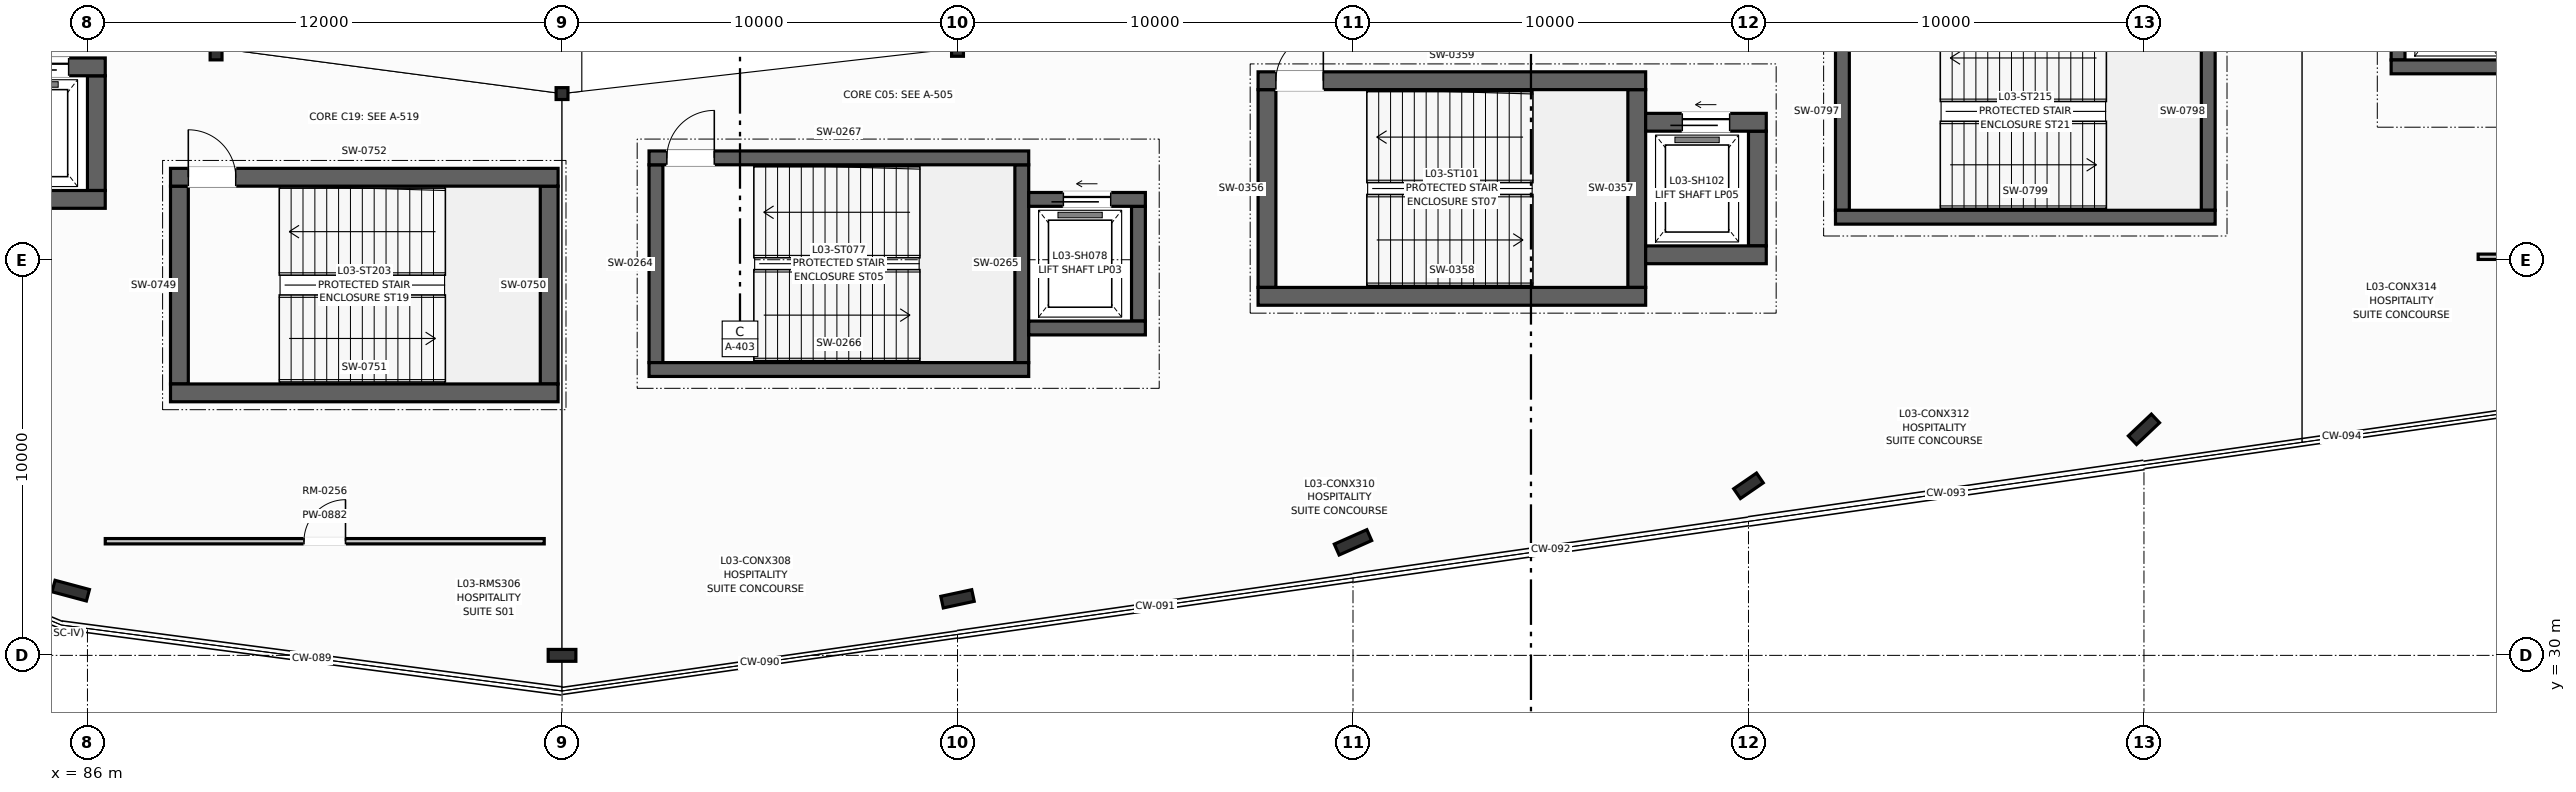
"""IFC4 building model, lengths in metres.
Left out: names, types, materials, properties, quantities, classifications, styles, units other than length and angle.
Written with IfcOpenShell. Run it as: python <this file> out.ifc"""

import sys

from ifc_helpers import new_model, si_unit, direction, frame, frame_2d, origin, origin_2d, place, context, subcontext, project, spatial, rectangle, i_section, extrude, element, fill, save


model = new_model("IFC4")
c1 = context("Model", 3, precision=1e-05, world=origin(), true_north=direction((0.0, 1.0)))
c2 = subcontext(c1, "Body", "Model", "MODEL_VIEW")
j1 = project(units=[si_unit("LENGTHUNIT", "METRE"), si_unit("PLANEANGLEUNIT", "RADIAN")], contexts=[c1])
p1 = place(None, origin())
s1 = spatial("IfcSite", under=j1, at=p1, CompositionType="ELEMENT")
p2 = place(p1, origin())
s2 = spatial("IfcBuilding", under=s1, at=p2, CompositionType="ELEMENT")
p3 = place(p2, frame((0.0, 0.0, 13.5)))
s3 = spatial("IfcBuildingStorey", under=s2, at=p3, CompositionType="ELEMENT", Elevation=13.5)
p4 = place(p3, frame((89.252, 45.352, 0.0), z_axis=(0.0, 0.0, 1.0), x_axis=(1.0, 0.0, 0.0)))
e1 = element("IfcColumn", 1, at=p4, inside=s3, PredefinedType="COLUMN", context=c2, shape_type="SweptSolid", body=[
    extrude(i_section(OverallWidth=0.3, OverallDepth=0.6, WebThickness=0.015, FlangeThickness=0.03, at=origin_2d()), origin(), (0.0, 0.0, 1.0), 4.5),
])
p5 = place(p3, frame((98.0, 44.2, 0.0), z_axis=(0.0, 0.0, 1.0), x_axis=(1.0, 0.0, 0.0)))
e2 = element("IfcColumn", 2, at=p5, inside=s3, PredefinedType="COLUMN", context=c2, shape_type="SweptSolid", body=[
    extrude(i_section(OverallWidth=0.3, OverallDepth=0.3, WebThickness=0.011, FlangeThickness=0.019, at=origin_2d()), origin(), (0.0, 0.0, 1.0), 4.5),
])
p6 = place(p3, frame((108.0, 45.343, 0.0), z_axis=(0.0, 0.0, 1.0), x_axis=(1.0, 0.0, 0.0)))
e3 = element("IfcColumn", 3, at=p6, inside=s3, PredefinedType="COLUMN", context=c2, shape_type="SweptSolid", body=[
    extrude(i_section(OverallWidth=0.3, OverallDepth=0.4, WebThickness=0.013, FlangeThickness=0.024, at=origin_2d()), origin(), (0.0, 0.0, 1.0), 4.5),
])
p7 = place(p3, frame((85.577, 31.636, 0.0), z_axis=(0.0, 0.0, 1.0), x_axis=(0.258819045103, 0.965925826289, 0.0)))
e4 = element("IfcColumn", 4, at=p7, inside=s3, PredefinedType="COLUMN", context=c2, shape_type="SweptSolid", body=[
    extrude(i_section(OverallWidth=0.3, OverallDepth=0.9, WebThickness=0.019, FlangeThickness=0.035, at=origin_2d()), origin(), (0.0, 0.0, 1.0), 4.5),
])
p8 = place(p3, frame((98.0, 30.0, 0.0), z_axis=(0.0, 0.0, 1.0), x_axis=(0.0, 1.0, 0.0)))
e5 = element("IfcColumn", 5, at=p8, inside=s3, PredefinedType="COLUMN", context=c2, shape_type="SweptSolid", body=[
    extrude(i_section(OverallWidth=0.3, OverallDepth=0.7, WebThickness=0.017, FlangeThickness=0.032, at=origin_2d()), origin(), (0.0, 0.0, 1.0), 4.5),
])
p9 = place(p3, frame((108.0, 31.429, 0.0), z_axis=(0.0, 0.0, 1.0), x_axis=(-0.209618562904, 0.977783236759, 0.0)))
e6 = element("IfcColumn", 6, at=p9, inside=s3, PredefinedType="COLUMN", context=c2, shape_type="SweptSolid", body=[
    extrude(i_section(OverallWidth=0.3, OverallDepth=0.8, WebThickness=0.018, FlangeThickness=0.033, at=origin_2d()), origin(), (0.0, 0.0, 1.0), 4.5),
])
p10 = place(p3, frame((118.0, 32.857, 0.0), z_axis=(0.0, 0.0, 1.0), x_axis=(-0.40514158678, 0.914253955234, 0.0)))
e7 = element("IfcColumn", 7, at=p10, inside=s3, PredefinedType="COLUMN", context=c2, shape_type="SweptSolid", body=[
    extrude(i_section(OverallWidth=0.3, OverallDepth=0.9, WebThickness=0.019, FlangeThickness=0.035, at=origin_2d()), origin(), (0.0, 0.0, 1.0), 4.5),
])
p11 = place(p3, frame((128.0, 34.286, 0.0), z_axis=(0.0, 0.0, 1.0), x_axis=(-0.566406236925, 0.824126188622, 0.0)))
e8 = element("IfcColumn", 8, at=p11, inside=s3, PredefinedType="COLUMN", context=c2, shape_type="SweptSolid", body=[
    extrude(i_section(OverallWidth=0.3, OverallDepth=0.7, WebThickness=0.017, FlangeThickness=0.032, at=origin_2d()), origin(), (0.0, 0.0, 1.0), 4.5),
])
p12 = place(p3, frame((138.0, 35.714, 0.0), z_axis=(0.0, 0.0, 1.0), x_axis=(-0.687087510804, 0.726574670971, 0.0)))
e9 = element("IfcColumn", 9, at=p12, inside=s3, PredefinedType="COLUMN", context=c2, shape_type="SweptSolid", body=[
    extrude(i_section(OverallWidth=0.3, OverallDepth=0.8, WebThickness=0.018, FlangeThickness=0.033, at=origin_2d()), origin(), (0.0, 0.0, 1.0), 4.5),
])
p13 = place(p3, frame((86.225, 41.75, 0.0), z_axis=(0.0, 0.0, 1.0), x_axis=(0.0, 1.0, 0.0)))
e10 = element("IfcWall", 10, at=p13, inside=s3, PredefinedType="SHEAR", context=c2, shape_type="SweptSolid", body=[
    extrude(rectangle(XDim=2.9, YDim=0.45, at=frame_2d((1.45, 0.0))), origin(), (0.0, 0.0, 1.0), 4.25),
])
p14 = place(p3, frame((83.4, 41.525, 0.0), z_axis=(0.0, 0.0, 1.0), x_axis=(1.0, 0.0, 0.0)))
e11 = element("IfcWall", 11, at=p14, inside=s3, PredefinedType="SHEAR", context=c2, shape_type="SweptSolid", body=[
    extrude(rectangle(XDim=3.05, YDim=0.45, at=frame_2d((1.525, 0.0))), origin(), (0.0, 0.0, 1.0), 4.25),
])
p15 = place(p3, frame((83.4, 44.875, 0.0), z_axis=(0.0, 0.0, 1.0), x_axis=(1.0, 0.0, 0.0)))
e12 = element("IfcWall", 12, at=p15, inside=s3, PredefinedType="SHEAR", context=c2, shape_type="SweptSolid", body=[
    extrude(rectangle(XDim=3.05, YDim=0.45, at=frame_2d((1.525, 0.0))), origin(), (0.0, 0.0, 1.0), 4.25),
])
p16 = place(p15, frame((0.925, 0.0, 0.0)))
e13 = element("IfcOpeningElement", 13, at=p16, cuts=e12, PredefinedType="OPENING", context=c2, shape_type="SweptSolid", body=[
    extrude(rectangle(XDim=1.2, YDim=2.2, at=frame_2d((0.6, 1.1))), frame((0.0, 0.235, 0.0), z_axis=(0.0, -1.0, 0.0), x_axis=(1.0, 0.0, 0.0)), (0.0, 0.0, 1.0), 0.47),
])
for number, where, z_axis, x_axis in (
    (14, (100.375, 37.4, 0.0), (0.0, 0.0, 1.0), (0.0, 1.0, 0.0)),
    (15, (109.625, 37.4, 0.0), (0.0, 0.0, 1.0), (0.0, 1.0, 0.0)),
):
    element("IfcWall", number, at=place(p3, frame(where, z_axis=z_axis, x_axis=x_axis)), inside=s3, PredefinedType="SHEAR", context=c2, shape_type="SweptSolid", body=[
        extrude(rectangle(XDim=5.0, YDim=0.35, at=frame_2d((2.5, 0.0))), origin(), (0.0, 0.0, 1.0), 4.25),
    ])
p17 = place(p3, frame((100.2, 37.225, 0.0), z_axis=(0.0, 0.0, 1.0), x_axis=(1.0, 0.0, 0.0)))
e16 = element("IfcWall", 16, at=p17, inside=s3, PredefinedType="SHEAR", context=c2, shape_type="SweptSolid", body=[
    extrude(rectangle(XDim=9.6, YDim=0.35, at=frame_2d((4.8, 0.0))), origin(), (0.0, 0.0, 1.0), 4.25),
])
p18 = place(p3, frame((100.2, 42.575, 0.0), z_axis=(0.0, 0.0, 1.0), x_axis=(1.0, 0.0, 0.0)))
e17 = element("IfcWall", 17, at=p18, inside=s3, PredefinedType="SHEAR", context=c2, shape_type="SweptSolid", body=[
    extrude(rectangle(XDim=9.6, YDim=0.35, at=frame_2d((4.8, 0.0))), origin(), (0.0, 0.0, 1.0), 4.25),
])
p19 = place(p18, frame((0.45, 0.0, 0.0)))
e18 = element("IfcOpeningElement", 18, at=p19, cuts=e17, PredefinedType="OPENING", context=c2, shape_type="SweptSolid", body=[
    extrude(rectangle(XDim=1.2, YDim=2.2, at=frame_2d((0.6, 1.1))), frame((0.0, 0.185, 0.0), z_axis=(0.0, -1.0, 0.0), x_axis=(1.0, 0.0, 0.0)), (0.0, 0.0, 1.0), 0.37),
])
p20 = place(p3, frame((112.575, 38.45, 0.0), z_axis=(0.0, 0.0, 1.0), x_axis=(0.0, 1.0, 0.0)))
e19 = element("IfcWall", 19, at=p20, inside=s3, PredefinedType="SHEAR", context=c2, shape_type="SweptSolid", body=[
    extrude(rectangle(XDim=2.9, YDim=0.35, at=frame_2d((1.45, 0.0))), origin(), (0.0, 0.0, 1.0), 4.25),
])
p21 = place(p3, frame((109.8, 38.275, 0.0), z_axis=(0.0, 0.0, 1.0), x_axis=(1.0, 0.0, 0.0)))
e20 = element("IfcWall", 20, at=p21, inside=s3, PredefinedType="SHEAR", context=c2, shape_type="SweptSolid", body=[
    extrude(rectangle(XDim=2.95, YDim=0.35, at=frame_2d((1.475, 0.0))), origin(), (0.0, 0.0, 1.0), 4.25),
])
p22 = place(p3, frame((109.8, 41.525, 0.0), z_axis=(0.0, 0.0, 1.0), x_axis=(1.0, 0.0, 0.0)))
e21 = element("IfcWall", 21, at=p22, inside=s3, PredefinedType="SHEAR", context=c2, shape_type="SweptSolid", body=[
    extrude(rectangle(XDim=2.95, YDim=0.35, at=frame_2d((1.475, 0.0))), origin(), (0.0, 0.0, 1.0), 4.25),
])
p23 = place(p22, frame((0.875, 0.0, 0.0)))
e22 = element("IfcOpeningElement", 22, at=p23, cuts=e21, PredefinedType="OPENING", context=c2, shape_type="SweptSolid", body=[
    extrude(rectangle(XDim=1.2, YDim=2.2, at=frame_2d((0.6, 1.1))), frame((0.0, 0.185, 0.0), z_axis=(0.0, -1.0, 0.0), x_axis=(1.0, 0.0, 0.0)), (0.0, 0.0, 1.0), 0.37),
])
for number, where, z_axis, x_axis in (
    (23, (115.825, 39.3, 0.0), (0.0, 0.0, 1.0), (0.0, 1.0, 0.0)),
    (24, (125.175, 39.3, 0.0), (0.0, 0.0, 1.0), (0.0, 1.0, 0.0)),
):
    element("IfcWall", number, at=place(p3, frame(where, z_axis=z_axis, x_axis=x_axis)), inside=s3, PredefinedType="SHEAR", context=c2, shape_type="SweptSolid", body=[
        extrude(rectangle(XDim=5.0, YDim=0.45, at=frame_2d((2.5, 0.0))), origin(), (0.0, 0.0, 1.0), 4.25),
    ])
p24 = place(p3, frame((115.6, 39.075, 0.0), z_axis=(0.0, 0.0, 1.0), x_axis=(1.0, 0.0, 0.0)))
e25 = element("IfcWall", 25, at=p24, inside=s3, PredefinedType="SHEAR", context=c2, shape_type="SweptSolid", body=[
    extrude(rectangle(XDim=9.8, YDim=0.45, at=frame_2d((4.9, 0.0))), origin(), (0.0, 0.0, 1.0), 4.25),
])
p25 = place(p3, frame((115.6, 44.525, 0.0), z_axis=(0.0, 0.0, 1.0), x_axis=(1.0, 0.0, 0.0)))
e26 = element("IfcWall", 26, at=p25, inside=s3, PredefinedType="SHEAR", context=c2, shape_type="SweptSolid", body=[
    extrude(rectangle(XDim=9.8, YDim=0.45, at=frame_2d((4.9, 0.0))), origin(), (0.0, 0.0, 1.0), 4.25),
])
p26 = place(p25, frame((0.45, 0.0, 0.0)))
e27 = element("IfcOpeningElement", 27, at=p26, cuts=e26, PredefinedType="OPENING", context=c2, shape_type="SweptSolid", body=[
    extrude(rectangle(XDim=1.2, YDim=2.2, at=frame_2d((0.6, 1.1))), frame((0.0, 0.235, 0.0), z_axis=(0.0, -1.0, 0.0), x_axis=(1.0, 0.0, 0.0)), (0.0, 0.0, 1.0), 0.47),
])
p27 = place(p3, frame((128.225, 40.35, 0.0), z_axis=(0.0, 0.0, 1.0), x_axis=(0.0, 1.0, 0.0)))
e28 = element("IfcWall", 28, at=p27, inside=s3, PredefinedType="SHEAR", context=c2, shape_type="SweptSolid", body=[
    extrude(rectangle(XDim=2.9, YDim=0.45, at=frame_2d((1.45, 0.0))), origin(), (0.0, 0.0, 1.0), 4.25),
])
p28 = place(p3, frame((125.4, 40.125, 0.0), z_axis=(0.0, 0.0, 1.0), x_axis=(1.0, 0.0, 0.0)))
e29 = element("IfcWall", 29, at=p28, inside=s3, PredefinedType="SHEAR", context=c2, shape_type="SweptSolid", body=[
    extrude(rectangle(XDim=3.05, YDim=0.45, at=frame_2d((1.525, 0.0))), origin(), (0.0, 0.0, 1.0), 4.25),
])
p29 = place(p3, frame((125.4, 43.475, 0.0), z_axis=(0.0, 0.0, 1.0), x_axis=(1.0, 0.0, 0.0)))
e30 = element("IfcWall", 30, at=p29, inside=s3, PredefinedType="SHEAR", context=c2, shape_type="SweptSolid", body=[
    extrude(rectangle(XDim=3.05, YDim=0.45, at=frame_2d((1.525, 0.0))), origin(), (0.0, 0.0, 1.0), 4.25),
])
p30 = place(p29, frame((0.925, 0.0, 0.0)))
e31 = element("IfcOpeningElement", 31, at=p30, cuts=e30, PredefinedType="OPENING", context=c2, shape_type="SweptSolid", body=[
    extrude(rectangle(XDim=1.2, YDim=2.2, at=frame_2d((0.6, 1.1))), frame((0.0, 0.235, 0.0), z_axis=(0.0, -1.0, 0.0), x_axis=(1.0, 0.0, 0.0)), (0.0, 0.0, 1.0), 0.47),
])
p31 = place(p3, frame((144.425, 45.05, 0.0), z_axis=(0.0, 0.0, 1.0), x_axis=(0.0, 1.0, 0.0)))
e32 = element("IfcWall", 32, at=p31, inside=s3, PredefinedType="SHEAR", context=c2, shape_type="SweptSolid", body=[
    extrude(rectangle(XDim=2.9, YDim=0.35, at=frame_2d((1.45, 0.0))), origin(), (0.0, 0.0, 1.0), 4.25),
])
p32 = place(p3, frame((144.25, 44.875, 0.0), z_axis=(0.0, 0.0, 1.0), x_axis=(1.0, 0.0, 0.0)))
e33 = element("IfcWall", 33, at=p32, inside=s3, PredefinedType="SHEAR", context=c2, shape_type="SweptSolid", body=[
    extrude(rectangle(XDim=2.95, YDim=0.35, at=frame_2d((1.475, 0.0))), origin(), (0.0, 0.0, 1.0), 4.25),
])
for number, where, z_axis, x_axis in (
    (34, (88.325, 36.86, 0.0), (0.0, 0.0, 1.0), (0.0, 1.0, 0.0)),
    (35, (97.675, 36.86, 0.0), (0.0, 0.0, 1.0), (0.0, 1.0, 0.0)),
):
    element("IfcWall", number, at=place(p3, frame(where, z_axis=z_axis, x_axis=x_axis)), inside=s3, PredefinedType="SHEAR", context=c2, shape_type="SweptSolid", body=[
        extrude(rectangle(XDim=5.0, YDim=0.45, at=frame_2d((2.5, 0.0))), origin(), (0.0, 0.0, 1.0), 4.25),
    ])
p33 = place(p3, frame((88.1, 36.635, 0.0), z_axis=(0.0, 0.0, 1.0), x_axis=(1.0, 0.0, 0.0)))
e36 = element("IfcWall", 36, at=p33, inside=s3, PredefinedType="SHEAR", context=c2, shape_type="SweptSolid", body=[
    extrude(rectangle(XDim=9.8, YDim=0.45, at=frame_2d((4.9, 0.0))), origin(), (0.0, 0.0, 1.0), 4.25),
])
p34 = place(p3, frame((88.1, 42.085, 0.0), z_axis=(0.0, 0.0, 1.0), x_axis=(1.0, 0.0, 0.0)))
e37 = element("IfcWall", 37, at=p34, inside=s3, PredefinedType="SHEAR", context=c2, shape_type="SweptSolid", body=[
    extrude(rectangle(XDim=9.8, YDim=0.45, at=frame_2d((4.9, 0.0))), origin(), (0.0, 0.0, 1.0), 4.25),
])
p35 = place(p34, frame((0.45, 0.0, 0.0)))
e38 = element("IfcOpeningElement", 38, at=p35, cuts=e37, PredefinedType="OPENING", context=c2, shape_type="SweptSolid", body=[
    extrude(rectangle(XDim=1.2, YDim=2.2, at=frame_2d((0.6, 1.1))), frame((0.0, 0.235, 0.0), z_axis=(0.0, -1.0, 0.0), x_axis=(1.0, 0.0, 0.0)), (0.0, 0.0, 1.0), 0.47),
])
for number, where, z_axis, x_axis in (
    (39, (130.375, 41.25, 0.0), (0.0, 0.0, 1.0), (0.0, 1.0, 0.0)),
    (40, (139.625, 41.25, 0.0), (0.0, 0.0, 1.0), (0.0, 1.0, 0.0)),
):
    element("IfcWall", number, at=place(p3, frame(where, z_axis=z_axis, x_axis=x_axis)), inside=s3, PredefinedType="SHEAR", context=c2, shape_type="SweptSolid", body=[
        extrude(rectangle(XDim=5.0, YDim=0.35, at=frame_2d((2.5, 0.0))), origin(), (0.0, 0.0, 1.0), 4.25),
    ])
p36 = place(p3, frame((130.2, 41.075, 0.0), z_axis=(0.0, 0.0, 1.0), x_axis=(1.0, 0.0, 0.0)))
e41 = element("IfcWall", 41, at=p36, inside=s3, PredefinedType="SHEAR", context=c2, shape_type="SweptSolid", body=[
    extrude(rectangle(XDim=9.6, YDim=0.35, at=frame_2d((4.8, 0.0))), origin(), (0.0, 0.0, 1.0), 4.25),
])
p37 = place(p3, frame((86.45, 32.885, 0.0), z_axis=(0.0, 0.0, 1.0), x_axis=(1.0, 0.0, 0.0)))
e42 = element("IfcWall", 42, at=p37, inside=s3, PredefinedType="PARTITIONING", context=c2, shape_type="SweptSolid", body=[
    extrude(rectangle(XDim=11.1, YDim=0.135, at=frame_2d((5.55, 0.0))), origin(), (0.0, 0.0, 1.0), 3.22),
])
p38 = place(p37, frame((5.025, 0.0, 0.0)))
e43 = element("IfcOpeningElement", 43, at=p38, cuts=e42, PredefinedType="OPENING", context=c2, shape_type="SweptSolid", body=[
    extrude(rectangle(XDim=1.05, YDim=2.15, at=frame_2d((0.525, 1.075))), frame((0.0, 0.077, 0.0), z_axis=(0.0, -1.0, 0.0), x_axis=(1.0, 0.0, 0.0)), (0.0, 0.0, 1.0), 0.155),
])
p39 = place(p3, frame((146.45, 40.075, 0.0), z_axis=(0.0, 0.0, 1.0), x_axis=(1.0, 0.0, 0.0)))
e44 = element("IfcWall", 44, at=p39, inside=s3, PredefinedType="PARTITIONING", context=c2, shape_type="SweptSolid", body=[
    extrude(rectangle(XDim=11.1, YDim=0.135, at=frame_2d((5.55, 0.0))), origin(), (0.0, 0.0, 1.0), 3.22),
])
p40 = place(p39, frame((5.025, 0.0, 0.0)))
e45 = element("IfcOpeningElement", 45, at=p40, cuts=e44, PredefinedType="OPENING", context=c2, shape_type="SweptSolid", body=[
    extrude(rectangle(XDim=1.05, YDim=2.15, at=frame_2d((0.525, 1.075))), frame((0.0, 0.077, 0.0), z_axis=(0.0, -1.0, 0.0), x_axis=(1.0, 0.0, 0.0)), (0.0, 0.0, 1.0), 0.155),
])
p41 = place(p16, origin())
e46 = element("IfcDoor", 46, at=p41, inside=s3, OperationType="SLIDING_TO_LEFT", PredefinedType="DOOR", context=c2, shape_type="SweptSolid", body=[
    extrude(rectangle(XDim=1.2, YDim=2.2, at=frame_2d((0.6, 1.1))), frame((0.0, 0.025, 0.0), z_axis=(0.0, -1.0, 0.0), x_axis=(1.0, 0.0, 0.0)), (0.0, 0.0, 1.0), 0.05),
])
fill(e13, e46)
p42 = place(p19, origin())
e47 = element("IfcDoor", 47, at=p42, inside=s3, OperationType="SINGLE_SWING_RIGHT", PredefinedType="DOOR", context=c2, shape_type="SweptSolid", body=[
    extrude(rectangle(XDim=1.2, YDim=2.2, at=frame_2d((0.6, 1.1))), frame((0.0, 0.025, 0.0), z_axis=(0.0, -1.0, 0.0), x_axis=(1.0, 0.0, 0.0)), (0.0, 0.0, 1.0), 0.05),
])
fill(e18, e47)
p43 = place(p23, origin())
e48 = element("IfcDoor", 48, at=p43, inside=s3, OperationType="SLIDING_TO_LEFT", PredefinedType="DOOR", context=c2, shape_type="SweptSolid", body=[
    extrude(rectangle(XDim=1.2, YDim=2.2, at=frame_2d((0.6, 1.1))), frame((0.0, 0.025, 0.0), z_axis=(0.0, -1.0, 0.0), x_axis=(1.0, 0.0, 0.0)), (0.0, 0.0, 1.0), 0.05),
])
fill(e22, e48)
p44 = place(p26, origin())
e49 = element("IfcDoor", 49, at=p44, inside=s3, OperationType="SINGLE_SWING_RIGHT", PredefinedType="DOOR", context=c2, shape_type="SweptSolid", body=[
    extrude(rectangle(XDim=1.2, YDim=2.2, at=frame_2d((0.6, 1.1))), frame((0.0, 0.025, 0.0), z_axis=(0.0, -1.0, 0.0), x_axis=(1.0, 0.0, 0.0)), (0.0, 0.0, 1.0), 0.05),
])
fill(e27, e49)
p45 = place(p30, origin())
e50 = element("IfcDoor", 50, at=p45, inside=s3, OperationType="SLIDING_TO_LEFT", PredefinedType="DOOR", context=c2, shape_type="SweptSolid", body=[
    extrude(rectangle(XDim=1.2, YDim=2.2, at=frame_2d((0.6, 1.1))), frame((0.0, 0.025, 0.0), z_axis=(0.0, -1.0, 0.0), x_axis=(1.0, 0.0, 0.0)), (0.0, 0.0, 1.0), 0.05),
])
fill(e31, e50)
p46 = place(p35, origin())
e51 = element("IfcDoor", 51, at=p46, inside=s3, OperationType="SINGLE_SWING_LEFT", PredefinedType="DOOR", context=c2, shape_type="SweptSolid", body=[
    extrude(rectangle(XDim=1.2, YDim=2.2, at=frame_2d((0.6, 1.1))), frame((0.0, 0.025, 0.0), z_axis=(0.0, -1.0, 0.0), x_axis=(1.0, 0.0, 0.0)), (0.0, 0.0, 1.0), 0.05),
])
fill(e38, e51)
p47 = place(p38, origin())
e52 = element("IfcDoor", 52, at=p47, inside=s3, OperationType="SINGLE_SWING_RIGHT", PredefinedType="DOOR", context=c2, shape_type="SweptSolid", body=[
    extrude(rectangle(XDim=1.05, YDim=2.15, at=frame_2d((0.525, 1.075))), frame((0.0, 0.025, 0.0), z_axis=(0.0, -1.0, 0.0), x_axis=(1.0, 0.0, 0.0)), (0.0, 0.0, 1.0), 0.05),
])
fill(e43, e52)
save(model, sys.argv[1])
